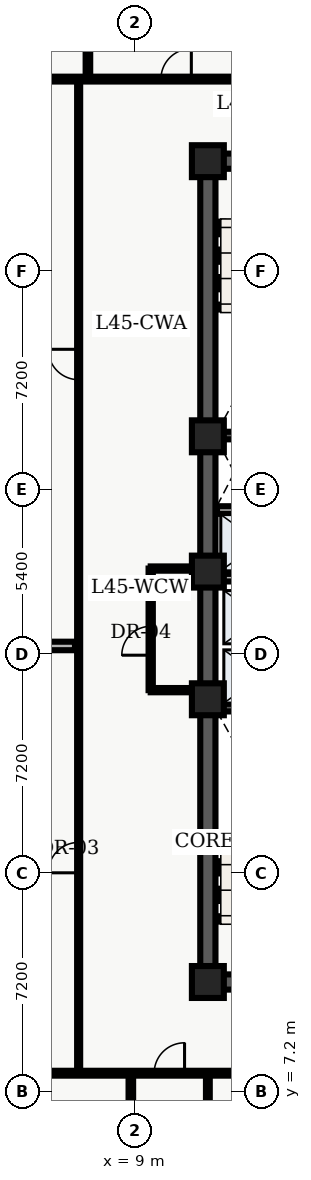
"""IFC4 building model, lengths in metres.
Left out: names, types, materials, properties, quantities, classifications, styles, units other than length and angle.
Written with IfcOpenShell. Run it as: python <this file> out.ifc"""

import sys

from ifc_helpers import new_model, entity, si_unit, converted_unit, direction, frame, origin_with_axes, origin_2d_with_axis, place, context, subcontext, project, spatial, polyline, rectangle, outline, extrude, element, fill, save


model = new_model("IFC4")
c1 = context("Model", 3, precision=1e-05, world=origin_with_axes(), true_north=direction((0.0, 1.0)))
c2 = subcontext(c1, "Body", "Model", "MODEL_VIEW")
j1 = project(units=[si_unit("LENGTHUNIT", "METRE"), converted_unit("PLANEANGLEUNIT", "DEGREE", entity("IfcPlaneAngleMeasure", 0.017), si_unit("PLANEANGLEUNIT", "RADIAN"), dimensions=[0, 0, 0, 0, 0, 0, 0])], contexts=[c1])
p1 = place(None, origin_with_axes())
s1 = spatial("IfcSite", under=j1, at=p1, CompositionType="ELEMENT")
p2 = place(p1, origin_with_axes())
s2 = spatial("IfcBuilding", under=s1, at=p2, CompositionType="ELEMENT")
p3 = place(p2, frame((0.0, 0.0, 183.6), z_axis=(0.0, 0.0, 1.0), x_axis=(1.0, 0.0, 0.0)))
s3 = spatial("IfcBuildingStorey", under=s2, at=p3, CompositionType="ELEMENT", Elevation=183.6)
p4 = place(p3, frame((11.4, 10.8, 0.0), z_axis=(0.0, 0.0, 1.0), x_axis=(0.0, 1.0, 0.0)))
e1 = element("IfcWall", 1, at=p4, inside=s3, PredefinedType="SHEAR", context=c2, shape_type="SweptSolid", body=[
    extrude(outline(polyline([(0.0, -0.25), (27.0, -0.25), (27.0, 0.25), (0.0, 0.25), (0.0, -0.25)])), origin_with_axes(), (0.0, 0.0, 1.0), 3.6),
])
p5 = place(p3, frame((11.4, 10.8, 0.0), z_axis=(0.0, 0.0, 1.0), x_axis=(1.0, 0.0, 0.0)))
e2 = element("IfcWall", 2, at=p5, inside=s3, PredefinedType="SHEAR", context=c2, shape_type="SweptSolid", body=[
    extrude(outline(polyline([(0.0, -0.25), (7.2, -0.25), (7.2, 0.25), (0.0, 0.25), (0.0, -0.25)])), origin_with_axes(), (0.0, 0.0, 1.0), 3.6),
])
p6 = place(p5, frame((2.625, 0.0, 0.0), z_axis=(0.0, 0.0, 1.0), x_axis=(1.0, 0.0, 0.0)))
e3 = element("IfcOpeningElement", 3, at=p6, cuts=e2, PredefinedType="OPENING", context=c2, shape_type="SweptSolid", body=[
    extrude(rectangle(XDim=1.05, YDim=0.52, at=origin_2d_with_axis()), origin_with_axes(), (0.0, 0.0, 1.0), 2.15),
])
p7 = place(p3, frame((11.4, 37.8, 0.0), z_axis=(0.0, 0.0, 1.0), x_axis=(1.0, 0.0, 0.0)))
e4 = element("IfcWall", 4, at=p7, inside=s3, PredefinedType="SHEAR", context=c2, shape_type="SweptSolid", body=[
    extrude(outline(polyline([(0.0, -0.25), (7.2, -0.25), (7.2, 0.25), (0.0, 0.25), (0.0, -0.25)])), origin_with_axes(), (0.0, 0.0, 1.0), 3.6),
])
p8 = place(p7, frame((2.625, 0.0, 0.0), z_axis=(0.0, 0.0, 1.0), x_axis=(1.0, 0.0, 0.0)))
e5 = element("IfcOpeningElement", 5, at=p8, cuts=e4, PredefinedType="OPENING", context=c2, shape_type="SweptSolid", body=[
    extrude(rectangle(XDim=1.05, YDim=0.52, at=origin_2d_with_axis()), origin_with_axes(), (0.0, 0.0, 1.0), 2.15),
])
for number, where, z_axis, x_axis in (
    (6, (11.65, 19.825, 0.0), (0.0, 0.0, 1.0), (1.0, 0.0, 0.0)),
    (7, (11.65, 28.775, 0.0), (0.0, 0.0, 1.0), (1.0, 0.0, 0.0)),
):
    element("IfcWall", number, at=place(p3, frame(where, z_axis=z_axis, x_axis=x_axis)), inside=s3, PredefinedType="SHEAR", context=c2, shape_type="SweptSolid", body=[
        extrude(outline(polyline([(0.0, -0.125), (6.7, -0.125), (6.7, 0.125), (0.0, 0.125), (0.0, -0.125)])), origin_with_axes(), (0.0, 0.0, 1.0), 3.6),
    ])
p9 = place(p3, frame((11.7, 24.1, 0.0), z_axis=(0.0, 0.0, 1.0), x_axis=(1.0, 0.0, 0.0)))
e8 = element("IfcWall", 8, at=p9, inside=s3, PredefinedType="SOLIDWALL", context=c2, shape_type="SweptSolid", body=[
    extrude(outline(polyline([(0.0, -0.125), (6.6, -0.125), (6.6, 0.125), (0.0, 0.125), (0.0, -0.125)])), origin_with_axes(), (0.0, 0.0, 1.0), 2.64),
])
p10 = place(p9, frame((3.75, 0.0, 0.0), z_axis=(0.0, 0.0, 1.0), x_axis=(1.0, 0.0, 0.0)))
e9 = element("IfcOpeningElement", 9, at=p10, cuts=e8, PredefinedType="OPENING", context=c2, shape_type="SweptSolid", body=[
    extrude(rectangle(XDim=0.9, YDim=0.27, at=origin_2d_with_axis()), origin_with_axes(), (0.0, 0.0, 1.0), 2.15),
])
p11 = place(p3, frame((11.7, 26.325, 0.0), z_axis=(0.0, 0.0, 1.0), x_axis=(1.0, 0.0, 0.0)))
e10 = element("IfcWall", 10, at=p11, inside=s3, PredefinedType="SOLIDWALL", context=c2, shape_type="SweptSolid", body=[
    extrude(outline(polyline([(0.0, -0.125), (6.6, -0.125), (6.6, 0.125), (0.0, 0.125), (0.0, -0.125)])), origin_with_axes(), (0.0, 0.0, 1.0), 2.64),
])
p12 = place(p11, frame((3.5, 0.0, 0.0), z_axis=(0.0, 0.0, 1.0), x_axis=(1.0, 0.0, 0.0)))
e11 = element("IfcOpeningElement", 11, at=p12, cuts=e10, PredefinedType="OPENING", context=c2, shape_type="SweptSolid", body=[
    extrude(rectangle(XDim=0.9, YDim=0.27, at=origin_2d_with_axis()), origin_with_axes(), (0.0, 0.0, 1.0), 2.15),
])
for number, where, z_axis, x_axis in (
    (12, (11.4, 10.8, 0.0), (0.0, 0.0, 1.0), (1.0, 0.0, 0.0)),
    (13, (11.4, 20.1, 0.0), (0.0, 0.0, 1.0), (1.0, 0.0, 0.0)),
    (14, (11.4, 24.3, 0.0), (0.0, 0.0, 1.0), (1.0, 0.0, 0.0)),
    (15, (11.4, 28.75, 0.0), (0.0, 0.0, 1.0), (1.0, 0.0, 0.0)),
    (16, (11.4, 37.8, 0.0), (0.0, 0.0, 1.0), (1.0, 0.0, 0.0)),
):
    element("IfcColumn", number, at=place(p3, frame(where, z_axis=z_axis, x_axis=x_axis)), inside=s3, PredefinedType="COLUMN", context=c2, shape_type="SweptSolid", body=[
        extrude(rectangle(XDim=1.05, YDim=1.05, at=origin_2d_with_axis()), origin_with_axes(), (0.0, 0.0, 1.0), 3.9),
    ])
p13 = place(p3, frame((9.52, 20.4, 0.0), z_axis=(0.0, 0.0, 1.0), x_axis=(0.0, 1.0, 0.0)))
e17 = element("IfcWall", 17, at=p13, inside=s3, PredefinedType="PARTITIONING", context=c2, shape_type="SweptSolid", body=[
    extrude(outline(polyline([(0.0, -0.07), (4.0, -0.07), (4.0, 0.07), (0.0, 0.07), (0.0, -0.07)])), origin_with_axes(), (0.0, 0.0, 1.0), 2.64),
])
p14 = place(p13, frame((1.625, 0.0, 0.0), z_axis=(0.0, 0.0, 1.0), x_axis=(1.0, 0.0, 0.0)))
e18 = element("IfcOpeningElement", 18, at=p14, cuts=e17, PredefinedType="OPENING", context=c2, shape_type="SweptSolid", body=[
    extrude(rectangle(XDim=0.95, YDim=0.16, at=origin_2d_with_axis()), origin_with_axes(), (0.0, 0.0, 1.0), 2.15),
])
for number, where, z_axis, x_axis in (
    (19, (9.52, 20.4, 0.0), (0.0, 0.0, 1.0), (1.0, 0.0, 0.0)),
    (20, (9.52, 24.4, 0.0), (0.0, 0.0, 1.0), (1.0, 0.0, 0.0)),
):
    element("IfcWall", number, at=place(p3, frame(where, z_axis=z_axis, x_axis=x_axis)), inside=s3, PredefinedType="PARTITIONING", context=c2, shape_type="SweptSolid", body=[
        extrude(outline(polyline([(0.0, -0.07), (1.58, -0.07), (1.58, 0.07), (0.0, 0.07), (0.0, -0.07)])), origin_with_axes(), (0.0, 0.0, 1.0), 2.64),
    ])
p15 = place(p3, frame((2.6, 7.8, 0.0), z_axis=(0.0, 0.0, 1.0), x_axis=(1.0, 0.0, 0.0)))
e21 = element("IfcWall", 21, at=p15, inside=s3, PredefinedType="PARTITIONING", context=c2, shape_type="SweptSolid", body=[
    extrude(outline(polyline([(0.0, -0.08), (18.55, -0.08), (18.55, 0.08), (0.0, 0.08), (0.0, -0.08)])), origin_with_axes(), (0.0, 0.0, 1.0), 2.64),
])
p16 = place(p15, frame((2.569, 0.0, 0.0), z_axis=(0.0, 0.0, 1.0), x_axis=(1.0, 0.0, 0.0)))
e22 = element("IfcOpeningElement", 22, at=p16, cuts=e21, PredefinedType="OPENING", context=c2, shape_type="SweptSolid", body=[
    extrude(rectangle(XDim=1.0, YDim=0.18, at=origin_2d_with_axis()), origin_with_axes(), (0.0, 0.0, 1.0), 2.15),
])
p17 = place(p15, frame((7.534, 0.0, 0.0), z_axis=(0.0, 0.0, 1.0), x_axis=(1.0, 0.0, 0.0)))
e23 = element("IfcOpeningElement", 23, at=p17, cuts=e21, PredefinedType="OPENING", context=c2, shape_type="SweptSolid", body=[
    extrude(rectangle(XDim=1.0, YDim=0.18, at=origin_2d_with_axis()), origin_with_axes(), (0.0, 0.0, 1.0), 2.15),
])
p18 = place(p15, frame((11.293, 0.0, 0.0), z_axis=(0.0, 0.0, 1.0), x_axis=(1.0, 0.0, 0.0)))
e24 = element("IfcOpeningElement", 24, at=p18, cuts=e21, PredefinedType="OPENING", context=c2, shape_type="SweptSolid", body=[
    extrude(rectangle(XDim=1.0, YDim=0.18, at=origin_2d_with_axis()), origin_with_axes(), (0.0, 0.0, 1.0), 2.15),
])
p19 = place(p15, frame((16.142, 0.0, 0.0), z_axis=(0.0, 0.0, 1.0), x_axis=(1.0, 0.0, 0.0)))
e25 = element("IfcOpeningElement", 25, at=p19, cuts=e21, PredefinedType="OPENING", context=c2, shape_type="SweptSolid", body=[
    extrude(rectangle(XDim=1.0, YDim=0.18, at=origin_2d_with_axis()), origin_with_axes(), (0.0, 0.0, 1.0), 2.15),
])
p20 = place(p3, frame((2.6, 40.5, 0.0), z_axis=(0.0, 0.0, 1.0), x_axis=(1.0, 0.0, 0.0)))
e26 = element("IfcWall", 26, at=p20, inside=s3, PredefinedType="PARTITIONING", context=c2, shape_type="SweptSolid", body=[
    extrude(outline(polyline([(0.0, -0.08), (23.459, -0.08), (23.459, 0.08), (0.0, 0.08), (0.0, -0.08)])), origin_with_axes(), (0.0, 0.0, 1.0), 2.64),
])
p21 = place(p20, frame((2.422, 0.0, 0.0), z_axis=(0.0, 0.0, 1.0), x_axis=(1.0, 0.0, 0.0)))
e27 = element("IfcOpeningElement", 27, at=p21, cuts=e26, PredefinedType="OPENING", context=c2, shape_type="SweptSolid", body=[
    extrude(rectangle(XDim=1.0, YDim=0.18, at=origin_2d_with_axis()), origin_with_axes(), (0.0, 0.0, 1.0), 2.15),
])
p22 = place(p20, frame((7.756, 0.0, 0.0), z_axis=(0.0, 0.0, 1.0), x_axis=(1.0, 0.0, 0.0)))
e28 = element("IfcOpeningElement", 28, at=p22, cuts=e26, PredefinedType="OPENING", context=c2, shape_type="SweptSolid", body=[
    extrude(rectangle(XDim=1.0, YDim=0.18, at=origin_2d_with_axis()), origin_with_axes(), (0.0, 0.0, 1.0), 2.15),
])
p23 = place(p20, frame((14.089, 0.0, 0.0), z_axis=(0.0, 0.0, 1.0), x_axis=(1.0, 0.0, 0.0)))
e29 = element("IfcOpeningElement", 29, at=p23, cuts=e26, PredefinedType="OPENING", context=c2, shape_type="SweptSolid", body=[
    extrude(rectangle(XDim=1.2, YDim=0.18, at=origin_2d_with_axis()), origin_with_axes(), (0.0, 0.0, 1.0), 2.2),
])
p24 = place(p3, frame((7.15, 7.8, 0.0), z_axis=(0.0, 0.0, 1.0), x_axis=(0.0, 1.0, 0.0)))
e30 = element("IfcWall", 30, at=p24, inside=s3, PredefinedType="PARTITIONING", context=c2, shape_type="SweptSolid", body=[
    extrude(outline(polyline([(0.0, -0.05), (32.7, -0.05), (32.7, 0.05), (0.0, 0.05), (0.0, -0.05)])), origin_with_axes(), (0.0, 0.0, 1.0), 2.64),
])
p25 = place(p24, frame((7.092, 0.0, 0.0), z_axis=(0.0, 0.0, 1.0), x_axis=(1.0, 0.0, 0.0)))
e31 = element("IfcOpeningElement", 31, at=p25, cuts=e30, PredefinedType="OPENING", context=c2, shape_type="SweptSolid", body=[
    extrude(rectangle(XDim=1.0, YDim=0.12, at=origin_2d_with_axis()), origin_with_axes(), (0.0, 0.0, 1.0), 2.15),
])
p26 = place(p24, frame((23.312, 0.0, 0.0), z_axis=(0.0, 0.0, 1.0), x_axis=(1.0, 0.0, 0.0)))
e32 = element("IfcOpeningElement", 32, at=p26, cuts=e30, PredefinedType="OPENING", context=c2, shape_type="SweptSolid", body=[
    extrude(rectangle(XDim=1.0, YDim=0.12, at=origin_2d_with_axis()), origin_with_axes(), (0.0, 0.0, 1.0), 2.15),
])
p27 = place(p3, frame((0.335, 21.854, 0.0), z_axis=(0.0, 0.0, 1.0), x_axis=(1.0, 0.0, 0.0)))
e33 = element("IfcWall", 33, at=p27, inside=s3, PredefinedType="PARTITIONING", context=c2, shape_type="SweptSolid", body=[
    extrude(outline(polyline([(0.0, -0.14), (6.695, -0.14), (6.695, 0.14), (0.0, 0.14), (0.0, -0.14)])), origin_with_axes(), (0.0, 0.0, 1.0), 2.64),
])
p28 = place(p3, frame((8.867, 0.335, 0.0), z_axis=(0.0, 0.0, 1.0), x_axis=(0.0, 1.0, 0.0)))
e34 = element("IfcWall", 34, at=p28, inside=s3, PredefinedType="PARTITIONING", context=c2, shape_type="SweptSolid", body=[
    extrude(outline(polyline([(0.0, -0.075), (7.365, -0.075), (7.365, 0.075), (0.0, 0.075), (0.0, -0.075)])), origin_with_axes(), (0.0, 0.0, 1.0), 2.64),
])
p29 = place(p3, frame((11.4, 0.335, 0.0), z_axis=(0.0, 0.0, 1.0), x_axis=(0.0, 1.0, 0.0)))
e35 = element("IfcWall", 35, at=p29, inside=s3, PredefinedType="PARTITIONING", context=c2, shape_type="SweptSolid", body=[
    extrude(outline(polyline([(0.0, -0.062), (7.365, -0.062), (7.365, 0.062), (0.0, 0.062), (0.0, -0.062)])), origin_with_axes(), (0.0, 0.0, 1.0), 2.64),
])
p30 = place(p3, frame((7.455, 40.6, 0.0), z_axis=(0.0, 0.0, 1.0), x_axis=(0.0, 1.0, 0.0)))
e36 = element("IfcWall", 36, at=p30, inside=s3, PredefinedType="PARTITIONING", context=c2, shape_type="SweptSolid", body=[
    extrude(outline(polyline([(0.0, -0.075), (7.665, -0.075), (7.665, 0.075), (0.0, 0.075), (0.0, -0.075)])), origin_with_axes(), (0.0, 0.0, 1.0), 2.64),
])
p31 = place(p13, frame((1.625, 0.0, 0.0), z_axis=(0.0, 0.0, 1.0), x_axis=(1.0, 0.0, 0.0)))
e37 = element("IfcDoor", 37, at=p31, inside=s3, OperationType="SINGLE_SWING_LEFT", PredefinedType="DOOR", context=c2, shape_type="SweptSolid", body=[
    extrude(rectangle(XDim=0.95, YDim=0.084, at=origin_2d_with_axis()), origin_with_axes(), (0.0, 0.0, 1.0), 2.15),
])
fill(e18, e37)
p32 = place(p24, frame((7.092, 0.0, 0.0), z_axis=(0.0, 0.0, 1.0), x_axis=(1.0, 0.0, 0.0)))
e38 = element("IfcDoor", 38, at=p32, inside=s3, OperationType="SINGLE_SWING_LEFT", PredefinedType="DOOR", context=c2, shape_type="SweptSolid", body=[
    extrude(rectangle(XDim=1.0, YDim=0.06, at=origin_2d_with_axis()), origin_with_axes(), (0.0, 0.0, 1.0), 2.15),
])
fill(e31, e38)
p33 = place(p24, frame((23.312, 0.0, 0.0), z_axis=(0.0, 0.0, 1.0), x_axis=(1.0, 0.0, 0.0)))
e39 = element("IfcDoor", 39, at=p33, inside=s3, OperationType="SINGLE_SWING_RIGHT", PredefinedType="DOOR", context=c2, shape_type="SweptSolid", body=[
    extrude(rectangle(XDim=1.0, YDim=0.06, at=origin_2d_with_axis()), origin_with_axes(), (0.0, 0.0, 1.0), 2.15),
])
fill(e32, e39)
p34 = place(p15, frame((7.534, 0.0, 0.0), z_axis=(0.0, 0.0, 1.0), x_axis=(1.0, 0.0, 0.0)))
e40 = element("IfcDoor", 40, at=p34, inside=s3, OperationType="SINGLE_SWING_RIGHT", PredefinedType="DOOR", context=c2, shape_type="SweptSolid", body=[
    extrude(rectangle(XDim=1.0, YDim=0.09, at=origin_2d_with_axis()), origin_with_axes(), (0.0, 0.0, 1.0), 2.15),
])
fill(e23, e40)
p35 = place(p20, frame((7.756, 0.0, 0.0), z_axis=(0.0, 0.0, 1.0), x_axis=(1.0, 0.0, 0.0)))
e41 = element("IfcDoor", 41, at=p35, inside=s3, OperationType="SINGLE_SWING_RIGHT", PredefinedType="DOOR", context=c2, shape_type="SweptSolid", body=[
    extrude(rectangle(XDim=1.0, YDim=0.09, at=origin_2d_with_axis()), origin_with_axes(), (0.0, 0.0, 1.0), 2.15),
])
fill(e28, e41)
save(model, sys.argv[1])
